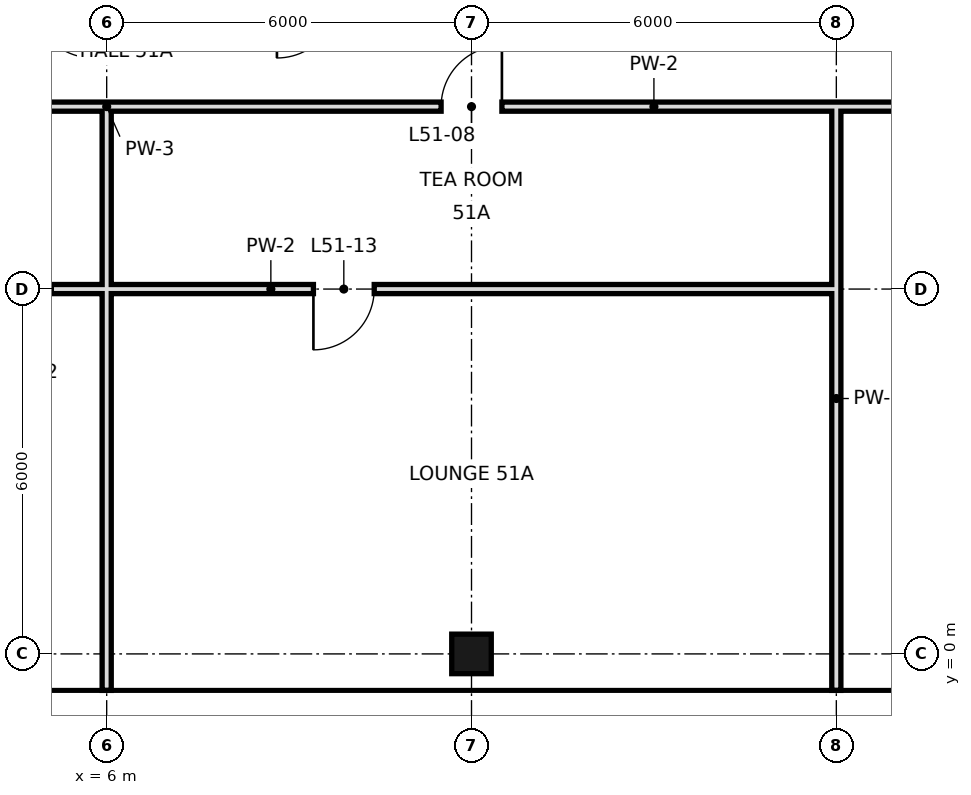
"""IFC4 building model, lengths in metres.
Left out: names, types, materials, properties, quantities, classifications, styles, units other than length and angle.
Written with IfcOpenShell. Run it as: python <this file> out.ifc"""

import sys

from ifc_helpers import new_model, si_unit, direction, frame, frame_2d, origin, origin_2d, place, context, subcontext, project, spatial, rectangle, hollow_rectangle, extrude, element, fill, save


model = new_model("IFC4")
c1 = context("Model", 3, precision=1e-05, world=origin(), true_north=direction((0.0, 1.0)))
c2 = subcontext(c1, "Body", "Model", "MODEL_VIEW")
j1 = project(units=[si_unit("LENGTHUNIT", "METRE"), si_unit("PLANEANGLEUNIT", "RADIAN")], contexts=[c1])
p1 = place(None, origin())
s1 = spatial("IfcSite", under=j1, at=p1, CompositionType="ELEMENT")
p2 = place(p1, origin())
s2 = spatial("IfcBuilding", under=s1, at=p2, CompositionType="ELEMENT")
p3 = place(p2, frame((0.0, 0.0, 219.0)))
s3 = spatial("IfcBuildingStorey", under=s2, at=p3, CompositionType="ELEMENT", Elevation=219.0)
p4 = place(p3, frame((12.0, 0.0, 0.0), z_axis=(0.0, 0.0, 1.0), x_axis=(1.0, 0.0, 0.0)))
e1 = element("IfcColumn", 1, at=p4, inside=s3, PredefinedType="COLUMN", context=c2, shape_type="SweptSolid", body=[
    extrude(hollow_rectangle(XDim=0.65, YDim=0.65, WallThickness=0.032, at=origin_2d()), origin(), (0.0, 0.0, 1.0), 3.6),
])
p5 = place(p3, frame((18.0, -0.6, 0.0), z_axis=(0.0, 0.0, 1.0), x_axis=(0.0, 1.0, 0.0)))
e2 = element("IfcWall", 2, at=p5, inside=s3, PredefinedType="PARTITIONING", context=c2, shape_type="SweptSolid", body=[
    extrude(rectangle(XDim=9.6, YDim=0.15, at=frame_2d((4.8, 0.0))), origin(), (0.0, 0.0, 1.0), 2.72),
])
p6 = place(p3, frame((6.0, -0.6, 0.0), z_axis=(0.0, 0.0, 1.0), x_axis=(0.0, 1.0, 0.0)))
e3 = element("IfcWall", 3, at=p6, inside=s3, PredefinedType="PARTITIONING", context=c2, shape_type="SweptSolid", body=[
    extrude(rectangle(XDim=6.6, YDim=0.15, at=frame_2d((3.3, 0.0))), origin(), (0.0, 0.0, 1.0), 2.72),
])
p7 = place(p3, frame((6.0, 6.0, 0.0), z_axis=(0.0, 0.0, 1.0), x_axis=(0.0, 1.0, 0.0)))
e4 = element("IfcWall", 4, at=p7, inside=s3, PredefinedType="PARTITIONING", context=c2, shape_type="SweptSolid", body=[
    extrude(rectangle(XDim=3.0, YDim=0.15, at=frame_2d((1.5, 0.0))), origin(), (0.0, 0.0, 1.0), 2.72),
])
p8 = place(p3, frame((6.0, 6.0, 0.0), z_axis=(0.0, 0.0, 1.0), x_axis=(1.0, 0.0, 0.0)))
e5 = element("IfcWall", 5, at=p8, inside=s3, PredefinedType="PARTITIONING", context=c2, shape_type="SweptSolid", body=[
    extrude(rectangle(XDim=12.0, YDim=0.15, at=frame_2d((6.0, 0.0))), origin(), (0.0, 0.0, 1.0), 2.97),
])
p9 = place(p8, frame((3.4, 0.0, 0.0)))
e6 = element("IfcOpeningElement", 6, at=p9, cuts=e5, PredefinedType="OPENING", context=c2, shape_type="SweptSolid", body=[
    extrude(rectangle(XDim=1.0, YDim=2.4, at=frame_2d((0.5, 1.2))), frame((0.0, 0.085, 0.0), z_axis=(0.0, -1.0, 0.0), x_axis=(1.0, 0.0, 0.0)), (0.0, 0.0, 1.0), 0.17),
])
p10 = place(p3, frame((2.4, 6.0, 0.0), z_axis=(0.0, 0.0, 1.0), x_axis=(1.0, 0.0, 0.0)))
e7 = element("IfcWall", 7, at=p10, inside=s3, PredefinedType="PARTITIONING", context=c2, shape_type="SweptSolid", body=[
    extrude(rectangle(XDim=3.6, YDim=0.15, at=frame_2d((1.8, 0.0))), origin(), (0.0, 0.0, 1.0), 2.97),
])
p11 = place(p10, frame((1.79, 0.0, 0.0)))
e8 = element("IfcOpeningElement", 8, at=p11, cuts=e7, PredefinedType="OPENING", context=c2, shape_type="SweptSolid", body=[
    extrude(rectangle(XDim=0.9, YDim=2.4, at=frame_2d((0.45, 1.2))), frame((0.0, 0.085, 0.0), z_axis=(0.0, -1.0, 0.0), x_axis=(1.0, 0.0, 0.0)), (0.0, 0.0, 1.0), 0.17),
])
p12 = place(p3, frame((6.0, 9.0, 0.0), z_axis=(0.0, 0.0, 1.0), x_axis=(1.0, 0.0, 0.0)))
e9 = element("IfcWall", 9, at=p12, inside=s3, PredefinedType="PARTITIONING", context=c2, shape_type="SweptSolid", body=[
    extrude(rectangle(XDim=18.0, YDim=0.15, at=frame_2d((9.0, 0.0))), origin(), (0.0, 0.0, 1.0), 3.42),
])
p13 = place(p12, frame((5.5, 0.0, 0.0)))
e10 = element("IfcOpeningElement", 10, at=p13, cuts=e9, PredefinedType="OPENING", context=c2, shape_type="SweptSolid", body=[
    extrude(rectangle(XDim=1.0, YDim=2.4, at=frame_2d((0.5, 1.2))), frame((0.0, 0.085, 0.0), z_axis=(0.0, -1.0, 0.0), x_axis=(1.0, 0.0, 0.0)), (0.0, 0.0, 1.0), 0.17),
])
p14 = place(p12, frame((13.6, 0.0, 0.0)))
e11 = element("IfcOpeningElement", 11, at=p14, cuts=e9, PredefinedType="OPENING", context=c2, shape_type="SweptSolid", body=[
    extrude(rectangle(XDim=1.0, YDim=2.4, at=frame_2d((0.5, 1.2))), frame((0.0, 0.085, 0.0), z_axis=(0.0, -1.0, 0.0), x_axis=(1.0, 0.0, 0.0)), (0.0, 0.0, 1.0), 0.17),
])
p15 = place(p3, frame((2.4, 9.0, 0.0), z_axis=(0.0, 0.0, 1.0), x_axis=(1.0, 0.0, 0.0)))
e12 = element("IfcWall", 12, at=p15, inside=s3, PredefinedType="PARTITIONING", context=c2, shape_type="SweptSolid", body=[
    extrude(rectangle(XDim=3.6, YDim=0.15, at=frame_2d((1.8, 0.0))), origin(), (0.0, 0.0, 1.0), 3.42),
])
p16 = place(p13, frame((1.0, 0.0, 0.0), z_axis=(0.0, 0.0, 1.0), x_axis=(-1.0, 0.0, 0.0)))
e13 = element("IfcDoor", 13, at=p16, inside=s3, OperationType="SINGLE_SWING_LEFT", PredefinedType="DOOR", context=c2, shape_type="SweptSolid", body=[
    extrude(rectangle(XDim=1.0, YDim=2.4, at=frame_2d((0.5, 1.2))), frame((0.0, 0.025, 0.0), z_axis=(0.0, -1.0, 0.0), x_axis=(1.0, 0.0, 0.0)), (0.0, 0.0, 1.0), 0.05),
])
fill(e10, e13)
p17 = place(p9, frame((1.0, 0.0, 0.0), z_axis=(0.0, 0.0, 1.0), x_axis=(-1.0, 0.0, 0.0)))
e14 = element("IfcDoor", 14, at=p17, inside=s3, OperationType="SINGLE_SWING_RIGHT", PredefinedType="DOOR", context=c2, shape_type="SweptSolid", body=[
    extrude(rectangle(XDim=1.0, YDim=2.4, at=frame_2d((0.5, 1.2))), frame((0.0, 0.025, 0.0), z_axis=(0.0, -1.0, 0.0), x_axis=(1.0, 0.0, 0.0)), (0.0, 0.0, 1.0), 0.05),
])
fill(e6, e14)
save(model, sys.argv[1])
